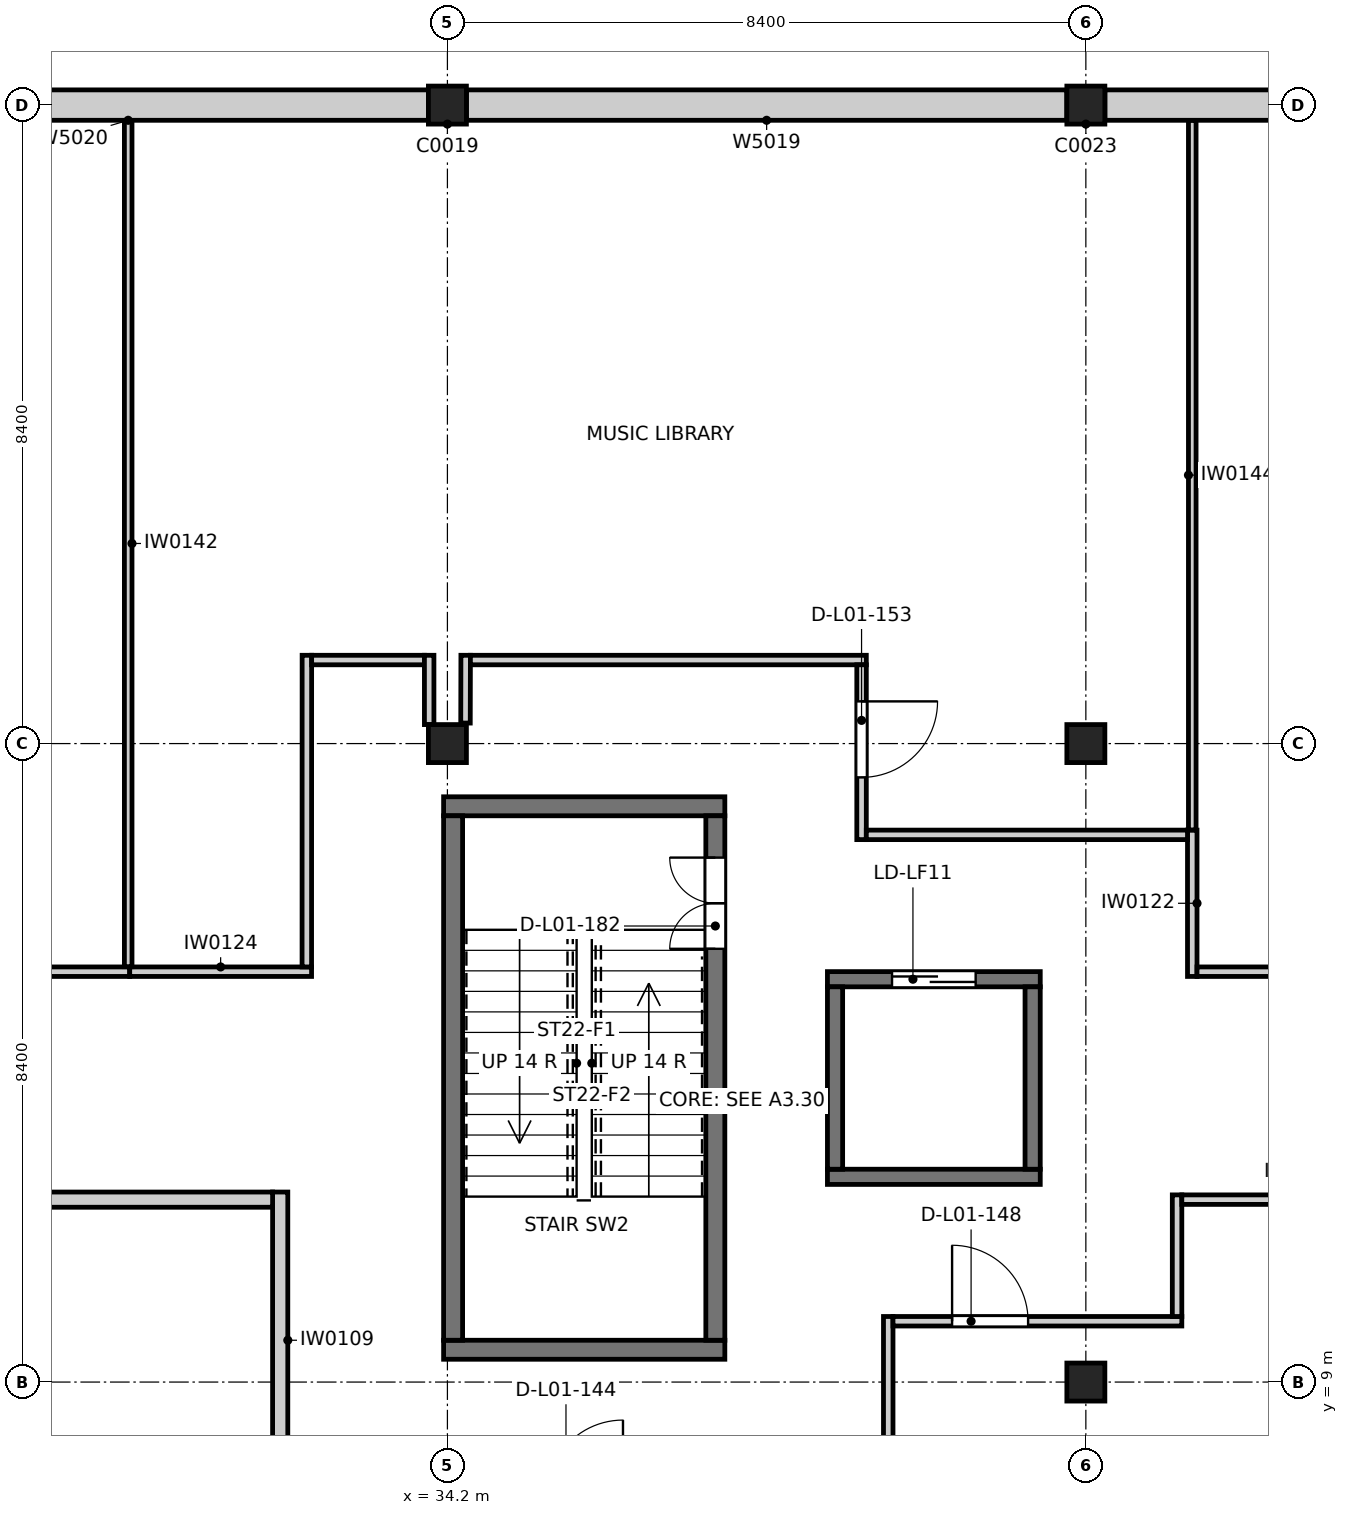
"""IFC4 building model, lengths in metres.
Left out: names, types, materials, properties, quantities, classifications, styles, units other than length and angle.
Written with IfcOpenShell. Run it as: python <this file> out.ifc"""

import sys

from ifc_helpers import new_model, si_unit, direction, frame, frame_2d, origin, origin_2d, place, context, subcontext, project, spatial, rectangle, extrude, element, fill, save


model = new_model("IFC4")
c1 = context("Model", 3, precision=1e-05, world=origin(), true_north=direction((0.0, 1.0)))
c2 = subcontext(c1, "Body", "Model", "MODEL_VIEW")
j1 = project(units=[si_unit("LENGTHUNIT", "METRE"), si_unit("PLANEANGLEUNIT", "RADIAN")], contexts=[c1])
p1 = place(None, origin())
s1 = spatial("IfcSite", under=j1, at=p1, CompositionType="ELEMENT")
p2 = place(p1, origin())
s2 = spatial("IfcBuilding", under=s1, at=p2, CompositionType="ELEMENT")
p3 = place(p2, frame((0.0, 0.0, 4.8)))
s3 = spatial("IfcBuildingStorey", under=s2, at=p3, CompositionType="ELEMENT", Elevation=4.8)
for number, where, z_axis, x_axis in (
    (1, (34.2, 17.4, 0.0), (0.0, 0.0, 1.0), (1.0, 0.0, 0.0)),
    (2, (34.2, 25.8, 0.0), (0.0, 0.0, 1.0), (1.0, 0.0, 0.0)),
    (3, (42.6, 9.0, 0.0), (0.0, 0.0, 1.0), (1.0, 0.0, 0.0)),
    (4, (42.6, 17.4, 0.0), (0.0, 0.0, 1.0), (1.0, 0.0, 0.0)),
    (5, (42.6, 25.8, 0.0), (0.0, 0.0, 1.0), (1.0, 0.0, 0.0)),
):
    element("IfcColumn", number, at=place(p3, frame(where, z_axis=z_axis, x_axis=x_axis)), inside=s3, PredefinedType="COLUMN", context=c2, shape_type="SweptSolid", body=[
        extrude(rectangle(XDim=0.5, YDim=0.5, at=origin_2d()), origin(), (0.0, 0.0, 1.0), 4.8),
    ])
for number, where, z_axis, x_axis in (
    (6, (34.15, 9.425, 0.0), (0.0, 0.0, 1.0), (1.0, 0.0, 0.0)),
    (7, (34.15, 16.575, 0.0), (0.0, 0.0, 1.0), (1.0, 0.0, 0.0)),
):
    element("IfcWall", number, at=place(p3, frame(where, z_axis=z_axis, x_axis=x_axis)), inside=s3, PredefinedType="SOLIDWALL", context=c2, shape_type="SweptSolid", body=[
        extrude(rectangle(XDim=3.7, YDim=0.25, at=frame_2d((1.85, 0.0))), origin(), (0.0, 0.0, 1.0), 4.8),
    ])
p4 = place(p3, frame((34.275, 9.55, 0.0), z_axis=(0.0, 0.0, 1.0), x_axis=(0.0, 1.0, 0.0)))
e8 = element("IfcWall", 8, at=p4, inside=s3, PredefinedType="SOLIDWALL", context=c2, shape_type="SweptSolid", body=[
    extrude(rectangle(XDim=6.9, YDim=0.25, at=frame_2d((3.45, 0.0))), origin(), (0.0, 0.0, 1.0), 4.8),
])
p5 = place(p3, frame((37.725, 9.55, 0.0), z_axis=(0.0, 0.0, 1.0), x_axis=(0.0, 1.0, 0.0)))
e9 = element("IfcWall", 9, at=p5, inside=s3, PredefinedType="SOLIDWALL", context=c2, shape_type="SweptSolid", body=[
    extrude(rectangle(XDim=6.9, YDim=0.25, at=frame_2d((3.45, 0.0))), origin(), (0.0, 0.0, 1.0), 4.8),
])
p6 = place(p5, frame((5.15, 0.0, 0.0)))
e10 = element("IfcOpeningElement", 10, at=p6, cuts=e9, PredefinedType="OPENING", context=c2, shape_type="SweptSolid", body=[
    extrude(rectangle(XDim=1.2, YDim=2.1, at=frame_2d((0.6, 1.05))), frame((0.0, 0.135, 0.0), z_axis=(0.0, -1.0, 0.0), x_axis=(1.0, 0.0, 0.0)), (0.0, 0.0, 1.0), 0.27),
])
p7 = place(p3, frame((39.2, 11.7, 0.0), z_axis=(0.0, 0.0, 1.0), x_axis=(1.0, 0.0, 0.0)))
e11 = element("IfcWall", 11, at=p7, inside=s3, PredefinedType="SOLIDWALL", context=c2, shape_type="SweptSolid", body=[
    extrude(rectangle(XDim=2.8, YDim=0.2, at=frame_2d((1.4, 0.0))), origin(), (0.0, 0.0, 1.0), 4.8),
])
p8 = place(p3, frame((39.2, 14.3, 0.0), z_axis=(0.0, 0.0, 1.0), x_axis=(1.0, 0.0, 0.0)))
e12 = element("IfcWall", 12, at=p8, inside=s3, PredefinedType="SOLIDWALL", context=c2, shape_type="SweptSolid", body=[
    extrude(rectangle(XDim=2.8, YDim=0.2, at=frame_2d((1.4, 0.0))), origin(), (0.0, 0.0, 1.0), 4.8),
])
p9 = place(p8, frame((0.85, 0.0, 0.0)))
e13 = element("IfcOpeningElement", 13, at=p9, cuts=e12, PredefinedType="OPENING", context=c2, shape_type="SweptSolid", body=[
    extrude(rectangle(XDim=1.1, YDim=2.1, at=frame_2d((0.55, 1.05))), frame((0.0, 0.11, 0.0), z_axis=(0.0, -1.0, 0.0), x_axis=(1.0, 0.0, 0.0)), (0.0, 0.0, 1.0), 0.22),
])
for number, where, z_axis, x_axis in (
    (14, (39.3, 11.8, 0.0), (0.0, 0.0, 1.0), (0.0, 1.0, 0.0)),
    (15, (41.9, 11.8, 0.0), (0.0, 0.0, 1.0), (0.0, 1.0, 0.0)),
):
    element("IfcWall", number, at=place(p3, frame(where, z_axis=z_axis, x_axis=x_axis)), inside=s3, PredefinedType="SOLIDWALL", context=c2, shape_type="SweptSolid", body=[
        extrude(rectangle(XDim=2.4, YDim=0.2, at=frame_2d((1.2, 0.0))), origin(), (0.0, 0.0, 1.0), 4.8),
    ])
p10 = place(p3, frame((32.0, 11.5, 0.0), z_axis=(0.0, 0.0, 1.0), x_axis=(0.0, -1.0, 0.0)))
e16 = element("IfcWall", 16, at=p10, inside=s3, PredefinedType="PARTITIONING", context=c2, shape_type="SweptSolid", body=[
    extrude(rectangle(XDim=3.9, YDim=0.2, at=frame_2d((1.95, 0.0))), origin(), (0.0, 0.0, 1.0), 3.84),
])
p11 = place(p3, frame((24.0, 11.4, 0.0), z_axis=(0.0, 0.0, 1.0), x_axis=(1.0, 0.0, 0.0)))
e17 = element("IfcWall", 17, at=p11, inside=s3, PredefinedType="PARTITIONING", context=c2, shape_type="SweptSolid", body=[
    extrude(rectangle(XDim=7.9, YDim=0.2, at=frame_2d((3.95, 0.0))), origin(), (0.0, 0.0, 1.0), 3.84),
])
p12 = place(p11, frame((3.49, 0.0, 0.0)))
e18 = element("IfcOpeningElement", 18, at=p12, cuts=e17, PredefinedType="OPENING", context=c2, shape_type="SweptSolid", body=[
    extrude(rectangle(XDim=1.0, YDim=2.1, at=frame_2d((0.5, 1.05))), frame((0.0, 0.11, 0.0), z_axis=(0.0, -1.0, 0.0), x_axis=(1.0, 0.0, 0.0)), (0.0, 0.0, 1.0), 0.22),
])
p13 = place(p3, frame((40.0, 7.6, 0.0), z_axis=(0.0, 0.0, 1.0), x_axis=(0.0, 1.0, 0.0)))
e19 = element("IfcWall", 19, at=p13, inside=s3, PredefinedType="PARTITIONING", context=c2, shape_type="SweptSolid", body=[
    extrude(rectangle(XDim=2.262, YDim=0.125, at=frame_2d((1.131, 0.0))), origin(), (0.0, 0.0, 1.0), 3.84),
])
p14 = place(p3, frame((40.062, 9.8, 0.0), z_axis=(0.0, 0.0, 1.0), x_axis=(1.0, 0.0, 0.0)))
e20 = element("IfcWall", 20, at=p14, inside=s3, PredefinedType="PARTITIONING", context=c2, shape_type="SweptSolid", body=[
    extrude(rectangle(XDim=3.8, YDim=0.125, at=frame_2d((1.9, 0.0))), origin(), (0.0, 0.0, 1.0), 3.84),
])
p15 = place(p14, frame((0.778, 0.0, 0.0)))
e21 = element("IfcOpeningElement", 21, at=p15, cuts=e20, PredefinedType="OPENING", context=c2, shape_type="SweptSolid", body=[
    extrude(rectangle(XDim=1.0, YDim=2.1, at=frame_2d((0.5, 1.05))), frame((0.0, 0.073, 0.0), z_axis=(0.0, -1.0, 0.0), x_axis=(1.0, 0.0, 0.0)), (0.0, 0.0, 1.0), 0.145),
])
p16 = place(p3, frame((43.8, 9.863, 0.0), z_axis=(0.0, 0.0, 1.0), x_axis=(0.0, 1.0, 0.0)))
e22 = element("IfcWall", 22, at=p16, inside=s3, PredefinedType="PARTITIONING", context=c2, shape_type="SweptSolid", body=[
    extrude(rectangle(XDim=1.6, YDim=0.125, at=frame_2d((0.8, 0.0))), origin(), (0.0, 0.0, 1.0), 4.64),
])
p17 = place(p3, frame((43.863, 11.4, 0.0), z_axis=(0.0, 0.0, 1.0), x_axis=(1.0, 0.0, 0.0)))
e23 = element("IfcWall", 23, at=p17, inside=s3, PredefinedType="PARTITIONING", context=c2, shape_type="SweptSolid", body=[
    extrude(rectangle(XDim=3.137, YDim=0.125, at=frame_2d((1.569, 0.0))), origin(), (0.0, 0.0, 1.0), 4.64),
])
p18 = place(p3, frame((23.262, 14.399, 0.0), z_axis=(0.0, 0.0, 1.0), x_axis=(1.0, 0.0, 0.0)))
e24 = element("IfcWall", 24, at=p18, inside=s3, PredefinedType="PARTITIONING", context=c2, shape_type="SweptSolid", body=[
    extrude(rectangle(XDim=6.758, YDim=0.125, at=frame_2d((3.379, 0.0))), origin(), (0.0, 0.0, 1.0), 3.84),
])
p19 = place(p18, frame((0.428, 0.0, 0.0)))
e25 = element("IfcOpeningElement", 25, at=p19, cuts=e24, PredefinedType="OPENING", context=c2, shape_type="SweptSolid", body=[
    extrude(rectangle(XDim=1.0, YDim=2.1, at=frame_2d((0.5, 1.05))), frame((0.0, 0.073, 0.0), z_axis=(0.0, -1.0, 0.0), x_axis=(1.0, 0.0, 0.0)), (0.0, 0.0, 1.0), 0.145),
])
p20 = place(p3, frame((44.0, 16.261, 0.0), z_axis=(0.0, 0.0, 1.0), x_axis=(0.0, -1.0, 0.0)))
e26 = element("IfcWall", 26, at=p20, inside=s3, PredefinedType="PARTITIONING", context=c2, shape_type="SweptSolid", body=[
    extrude(rectangle(XDim=1.925, YDim=0.125, at=frame_2d((0.962, 0.0))), origin(), (0.0, 0.0, 1.0), 4.04),
])
p21 = place(p3, frame((44.062, 14.399, 0.0), z_axis=(0.0, 0.0, 1.0), x_axis=(1.0, 0.0, 0.0)))
e27 = element("IfcWall", 27, at=p21, inside=s3, PredefinedType="PARTITIONING", context=c2, shape_type="SweptSolid", body=[
    extrude(rectangle(XDim=5.958, YDim=0.125, at=frame_2d((2.979, 0.0))), origin(), (0.0, 0.0, 1.0), 4.04),
])
p22 = place(p21, frame((1.578, 0.0, 0.0)))
e28 = element("IfcOpeningElement", 28, at=p22, cuts=e27, PredefinedType="OPENING", context=c2, shape_type="SweptSolid", body=[
    extrude(rectangle(XDim=0.9, YDim=2.1, at=frame_2d((0.45, 1.05))), frame((0.0, 0.073, 0.0), z_axis=(0.0, -1.0, 0.0), x_axis=(1.0, 0.0, 0.0)), (0.0, 0.0, 1.0), 0.145),
])
p23 = place(p3, frame((30.02, 14.399, 0.0), z_axis=(0.0, 0.0, 1.0), x_axis=(1.0, 0.0, 0.0)))
e29 = element("IfcWall", 29, at=p23, inside=s3, PredefinedType="PARTITIONING", context=c2, shape_type="SweptSolid", body=[
    extrude(rectangle(XDim=2.393, YDim=0.125, at=frame_2d((1.196, 0.0))), origin(), (0.0, 0.0, 1.0), 4.04),
])
p24 = place(p3, frame((32.35, 14.461, 0.0), z_axis=(0.0, 0.0, 1.0), x_axis=(0.000238180296, 0.999999971635, 0.0)))
e30 = element("IfcWall", 30, at=p24, inside=s3, PredefinedType="PARTITIONING", context=c2, shape_type="SweptSolid", body=[
    extrude(rectangle(XDim=4.1, YDim=0.125, at=frame_2d((2.05, 0.0))), origin(), (0.0, 0.0, 1.0), 3.84),
])
p25 = place(p3, frame((32.414, 18.499, 0.0), z_axis=(0.0, 0.0, 1.0), x_axis=(1.0, 0.0, 0.0)))
e31 = element("IfcWall", 31, at=p25, inside=s3, PredefinedType="PARTITIONING", context=c2, shape_type="SweptSolid", body=[
    extrude(rectangle(XDim=1.484, YDim=0.125, at=frame_2d((0.742, 0.0))), origin(), (0.0, 0.0, 1.0), 4.64),
])
p26 = place(p3, frame((33.96, 18.562, 0.0), z_axis=(0.0, 0.0, 1.0), x_axis=(0.0, -1.0, 0.0)))
e32 = element("IfcWall", 32, at=p26, inside=s3, PredefinedType="PARTITIONING", context=c2, shape_type="SweptSolid", body=[
    extrude(rectangle(XDim=0.912, YDim=0.125, at=frame_2d((0.456, 0.0))), origin(), (0.0, 0.0, 1.0), 3.84),
])
p27 = place(p3, frame((34.438, 17.67, 0.0), z_axis=(0.0, 0.0, 1.0), x_axis=(0.002464395583, 0.999996963373, 0.0)))
e33 = element("IfcWall", 33, at=p27, inside=s3, PredefinedType="PARTITIONING", context=c2, shape_type="SweptSolid", body=[
    extrude(rectangle(XDim=0.892, YDim=0.125, at=frame_2d((0.446, 0.0))), origin(), (0.0, 0.0, 1.0), 3.84),
])
p28 = place(p3, frame((34.502, 18.499, 0.0), z_axis=(0.0, 0.0, 1.0), x_axis=(1.0, 0.0, 0.0)))
e34 = element("IfcWall", 34, at=p28, inside=s3, PredefinedType="PARTITIONING", context=c2, shape_type="SweptSolid", body=[
    extrude(rectangle(XDim=5.209, YDim=0.125, at=frame_2d((2.604, 0.0))), origin(), (0.0, 0.0, 1.0), 4.64),
])
p29 = place(p3, frame((39.649, 18.437, 0.0), z_axis=(0.0, 0.0, 1.0), x_axis=(0.0, -1.0, 0.0)))
e35 = element("IfcWall", 35, at=p29, inside=s3, PredefinedType="PARTITIONING", context=c2, shape_type="SweptSolid", body=[
    extrude(rectangle(XDim=2.3, YDim=0.125, at=frame_2d((1.15, 0.0))), origin(), (0.0, 0.0, 1.0), 3.84),
])
p30 = place(p29, frame((0.481, 0.0, 0.0)))
e36 = element("IfcOpeningElement", 36, at=p30, cuts=e35, PredefinedType="OPENING", context=c2, shape_type="SweptSolid", body=[
    extrude(rectangle(XDim=1.0, YDim=2.1, at=frame_2d((0.5, 1.05))), frame((0.0, 0.073, 0.0), z_axis=(0.0, -1.0, 0.0), x_axis=(1.0, 0.0, 0.0)), (0.0, 0.0, 1.0), 0.145),
])
p31 = place(p3, frame((39.711, 16.199, 0.0), z_axis=(0.0, 0.0, 1.0), x_axis=(1.0, 0.0, 0.0)))
e37 = element("IfcWall", 37, at=p31, inside=s3, PredefinedType="PARTITIONING", context=c2, shape_type="SweptSolid", body=[
    extrude(rectangle(XDim=4.226, YDim=0.125, at=frame_2d((2.113, 0.0))), origin(), (0.0, 0.0, 1.0), 3.84),
])
p32 = place(p3, frame((30.0, 25.6, 0.0), z_axis=(0.0, 0.0, 1.0), x_axis=(0.0, -1.0, 0.0)))
e38 = element("IfcWall", 38, at=p32, inside=s3, PredefinedType="PARTITIONING", context=c2, shape_type="SweptSolid", body=[
    extrude(rectangle(XDim=11.135, YDim=0.1, at=frame_2d((5.567, 0.0))), origin(), (0.0, 0.0, 1.0), 3.84),
])
p33 = place(p3, frame((44.0, 16.264, 0.0), z_axis=(0.0, 0.0, 1.0), x_axis=(0.0, 1.0, 0.0)))
e39 = element("IfcWall", 39, at=p33, inside=s3, PredefinedType="PARTITIONING", context=c2, shape_type="SweptSolid", body=[
    extrude(rectangle(XDim=9.336, YDim=0.1, at=frame_2d((4.668, 0.0))), origin(), (0.0, 0.0, 1.0), 3.84),
])
p34 = place(p3, frame((50.75, 25.8, 0.0), z_axis=(0.0, 0.0, 1.0), x_axis=(-1.0, 0.0, 0.0)))
e40 = element("IfcWall", 40, at=p34, inside=s3, PredefinedType="SOLIDWALL", context=c2, shape_type="SweptSolid", body=[
    extrude(rectangle(XDim=7.9, YDim=0.4, at=frame_2d((3.95, 0.0))), origin(), (0.0, 0.0, 1.0), 3.84),
])
p35 = place(p34, frame((2.45, 0.0, 1.8)))
e41 = element("IfcOpeningElement", 41, at=p35, cuts=e40, PredefinedType="OPENING", context=c2, shape_type="SweptSolid", body=[
    extrude(rectangle(XDim=0.9, YDim=0.6, at=frame_2d((0.45, 0.3))), frame((0.0, 0.21, 0.0), z_axis=(0.0, -1.0, 0.0), x_axis=(1.0, 0.0, 0.0)), (0.0, 0.0, 1.0), 0.42),
])
p36 = place(p3, frame((42.35, 25.8, 0.0), z_axis=(0.0, 0.0, 1.0), x_axis=(-1.0, 0.0, 0.0)))
e42 = element("IfcWall", 42, at=p36, inside=s3, PredefinedType="SOLIDWALL", context=c2, shape_type="SweptSolid", body=[
    extrude(rectangle(XDim=7.9, YDim=0.4, at=frame_2d((3.95, 0.0))), origin(), (0.0, 0.0, 1.0), 3.84),
])
p37 = place(p3, frame((33.95, 25.8, 0.0), z_axis=(0.0, 0.0, 1.0), x_axis=(-1.0, 0.0, 0.0)))
e43 = element("IfcWall", 43, at=p37, inside=s3, PredefinedType="SOLIDWALL", context=c2, shape_type="SweptSolid", body=[
    extrude(rectangle(XDim=7.9, YDim=0.4, at=frame_2d((3.95, 0.0))), origin(), (0.0, 0.0, 1.0), 3.84),
])
p38 = place(p15, origin())
e44 = element("IfcDoor", 44, at=p38, inside=s3, OperationType="SINGLE_SWING_LEFT", PredefinedType="DOOR", context=c2, shape_type="SweptSolid", body=[
    extrude(rectangle(XDim=1.0, YDim=2.1, at=frame_2d((0.5, 1.05))), frame((0.0, 0.025, 0.0), z_axis=(0.0, -1.0, 0.0), x_axis=(1.0, 0.0, 0.0)), (0.0, 0.0, 1.0), 0.05),
])
fill(e21, e44)
p39 = place(p30, origin())
e45 = element("IfcDoor", 45, at=p39, inside=s3, OperationType="SINGLE_SWING_LEFT", PredefinedType="DOOR", context=c2, shape_type="SweptSolid", body=[
    extrude(rectangle(XDim=1.0, YDim=2.1, at=frame_2d((0.5, 1.05))), frame((0.0, 0.025, 0.0), z_axis=(0.0, -1.0, 0.0), x_axis=(1.0, 0.0, 0.0)), (0.0, 0.0, 1.0), 0.05),
])
fill(e36, e45)
p40 = place(p6, origin())
e46 = element("IfcDoor", 46, at=p40, inside=s3, OperationType="DOUBLE_DOOR_SINGLE_SWING", PredefinedType="DOOR", context=c2, shape_type="SweptSolid", body=[
    extrude(rectangle(XDim=1.2, YDim=2.1, at=frame_2d((0.6, 1.05))), frame((0.0, 0.025, 0.0), z_axis=(0.0, -1.0, 0.0), x_axis=(1.0, 0.0, 0.0)), (0.0, 0.0, 1.0), 0.05),
])
fill(e10, e46)
p41 = place(p9, origin())
e47 = element("IfcDoor", 47, at=p41, inside=s3, OperationType="SLIDING_TO_LEFT", PredefinedType="DOOR", context=c2, shape_type="SweptSolid", body=[
    extrude(rectangle(XDim=1.1, YDim=2.1, at=frame_2d((0.55, 1.05))), frame((0.0, 0.025, 0.0), z_axis=(0.0, -1.0, 0.0), x_axis=(1.0, 0.0, 0.0)), (0.0, 0.0, 1.0), 0.05),
])
fill(e13, e47)
save(model, sys.argv[1])
